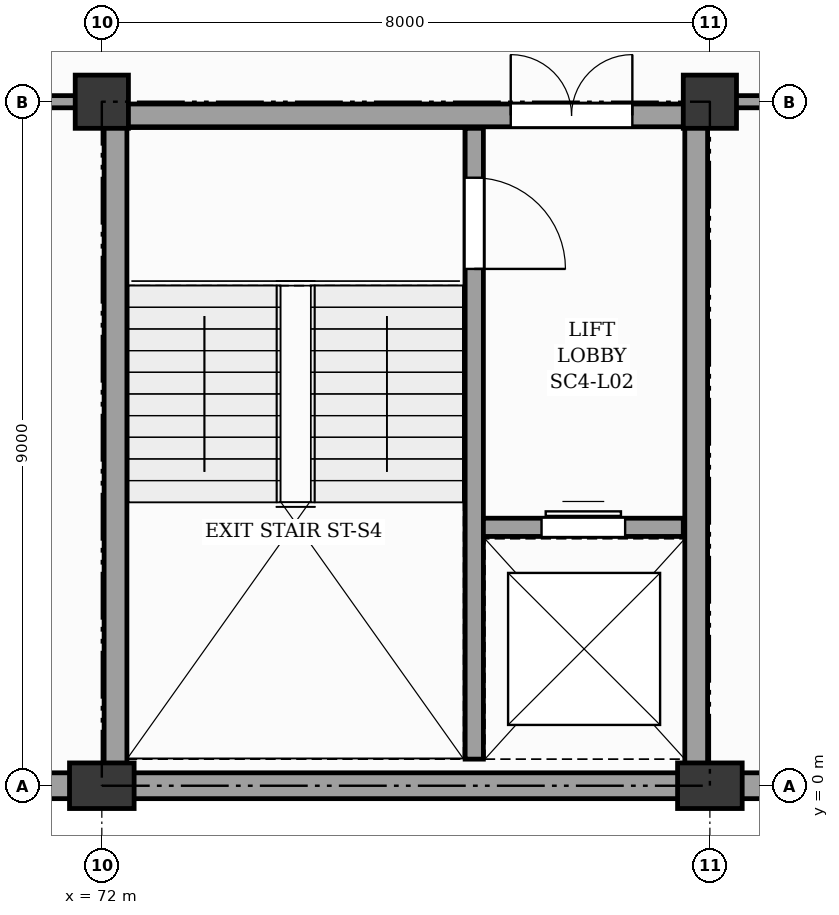
"""IFC4 building model, lengths in metres.
Left out: names, types, materials, properties, quantities, classifications, styles, units other than length and angle.
Written with IfcOpenShell. Run it as: python <this file> out.ifc"""

import sys

from ifc_helpers import new_model, si_unit, direction, frame, frame_2d, origin, origin_2d, place, context, subcontext, project, spatial, rectangle, extrude, element, fill, save


model = new_model("IFC4")
c1 = context("Model", 3, precision=1e-05, world=origin(), true_north=direction((0.0, 1.0)))
c2 = subcontext(c1, "Body", "Model", "MODEL_VIEW")
j1 = project(units=[si_unit("LENGTHUNIT", "METRE"), si_unit("PLANEANGLEUNIT", "RADIAN")], contexts=[c1])
p1 = place(None, origin())
s1 = spatial("IfcSite", under=j1, at=p1, CompositionType="ELEMENT")
p2 = place(p1, origin())
s2 = spatial("IfcBuilding", under=s1, at=p2, CompositionType="ELEMENT")
p3 = place(p2, frame((0.0, 0.0, 9.6)))
s3 = spatial("IfcBuildingStorey", under=s2, at=p3, CompositionType="ELEMENT", Elevation=9.6)
p4 = place(p3, frame((72.0, 0.0, 0.0), z_axis=(0.0, 0.0, 1.0), x_axis=(1.0, 0.0, 0.0)))
e1 = element("IfcColumn", 1, at=p4, inside=s3, PredefinedType="PILASTER", context=c2, shape_type="SweptSolid", body=[
    extrude(rectangle(XDim=0.85, YDim=0.6, at=origin_2d()), origin(), (0.0, 0.0, 1.0), 6.6),
])
p5 = place(p3, frame((72.0, 9.0, 0.0), z_axis=(0.0, 0.0, 1.0), x_axis=(1.0, 0.0, 0.0)))
e2 = element("IfcColumn", 2, at=p5, inside=s3, PredefinedType="COLUMN", context=c2, shape_type="SweptSolid", body=[
    extrude(rectangle(XDim=0.7, YDim=0.7, at=origin_2d()), origin(), (0.0, 0.0, 1.0), 6.6),
])
p6 = place(p3, frame((80.0, 0.0, 0.0), z_axis=(0.0, 0.0, 1.0), x_axis=(1.0, 0.0, 0.0)))
e3 = element("IfcColumn", 3, at=p6, inside=s3, PredefinedType="PILASTER", context=c2, shape_type="SweptSolid", body=[
    extrude(rectangle(XDim=0.85, YDim=0.6, at=origin_2d()), origin(), (0.0, 0.0, 1.0), 6.6),
])
p7 = place(p3, frame((80.0, 9.0, 0.0), z_axis=(0.0, 0.0, 1.0), x_axis=(1.0, 0.0, 0.0)))
e4 = element("IfcColumn", 4, at=p7, inside=s3, PredefinedType="COLUMN", context=c2, shape_type="SweptSolid", body=[
    extrude(rectangle(XDim=0.7, YDim=0.7, at=origin_2d()), origin(), (0.0, 0.0, 1.0), 6.6),
])
p8 = place(p3, frame((64.4, 0.0, 0.0), z_axis=(0.0, 0.0, 1.0), x_axis=(1.0, 0.0, 0.0)))
e5 = element("IfcWall", 5, at=p8, inside=s3, PredefinedType="SOLIDWALL", context=c2, shape_type="SweptSolid", body=[
    extrude(rectangle(XDim=7.2, YDim=0.34, at=frame_2d((3.6, 0.0))), origin(), (0.0, 0.0, 1.0), 4.98),
])
for number, where, z_axis, x_axis in (
    (6, (72.4, 0.0, 0.0), (0.0, 0.0, 1.0), (1.0, 0.0, 0.0)),
    (7, (80.4, 0.0, 0.0), (0.0, 0.0, 1.0), (1.0, 0.0, 0.0)),
):
    element("IfcWall", number, at=place(p3, frame(where, z_axis=z_axis, x_axis=x_axis)), inside=s3, PredefinedType="SOLIDWALL", context=c2, shape_type="SweptSolid", body=[
        extrude(rectangle(XDim=7.2, YDim=0.34, at=frame_2d((3.6, 0.0))), origin(), (0.0, 0.0, 1.0), 5.64),
    ])
p9 = place(p3, frame((76.9, 0.35, 0.0), z_axis=(0.0, 0.0, 1.0), x_axis=(0.0, 1.0, 0.0)))
e8 = element("IfcWall", 8, at=p9, inside=s3, PredefinedType="SHEAR", context=c2, shape_type="SweptSolid", body=[
    extrude(rectangle(XDim=8.3, YDim=0.24, at=frame_2d((4.15, 0.0))), origin(), (0.0, 0.0, 1.0), 6.32),
])
p10 = place(p9, frame((6.45, 0.0, 0.0)))
e9 = element("IfcOpeningElement", 9, at=p10, cuts=e8, PredefinedType="OPENING", context=c2, shape_type="SweptSolid", body=[
    extrude(rectangle(XDim=1.2, YDim=2.15, at=frame_2d((0.6, 1.075))), frame((0.0, 0.13, 0.0), z_axis=(0.0, -1.0, 0.0), x_axis=(1.0, 0.0, 0.0)), (0.0, 0.0, 1.0), 0.26),
])
p11 = place(p3, frame((77.02, 3.4, 0.0), z_axis=(0.0, 0.0, 1.0), x_axis=(1.0, 0.0, 0.0)))
e10 = element("IfcWall", 10, at=p11, inside=s3, PredefinedType="SHEAR", context=c2, shape_type="SweptSolid", body=[
    extrude(rectangle(XDim=2.63, YDim=0.24, at=frame_2d((1.315, 0.0))), origin(), (0.0, 0.0, 1.0), 6.32),
])
p12 = place(p11, frame((0.765, 0.0, 0.0)))
e11 = element("IfcOpeningElement", 11, at=p12, cuts=e10, PredefinedType="OPENING", context=c2, shape_type="SweptSolid", body=[
    extrude(rectangle(XDim=1.1, YDim=2.15, at=frame_2d((0.55, 1.075))), frame((0.0, 0.13, 0.0), z_axis=(0.0, -1.0, 0.0), x_axis=(1.0, 0.0, 0.0)), (0.0, 0.0, 1.0), 0.26),
])
for number, where, z_axis, x_axis in (
    (12, (72.18, 0.18, 0.0), (0.0, 0.0, 1.0), (0.0, 1.0, 0.0)),
    (13, (79.82, 0.18, 0.0), (0.0, 0.0, 1.0), (0.0, 1.0, 0.0)),
):
    element("IfcWall", number, at=place(p3, frame(where, z_axis=z_axis, x_axis=x_axis)), inside=s3, PredefinedType="SHEAR", context=c2, shape_type="SweptSolid", body=[
        extrude(rectangle(XDim=8.64, YDim=0.3, at=frame_2d((4.32, 0.0))), origin(), (0.0, 0.0, 1.0), 6.32),
    ])
p13 = place(p3, frame((72.03, 8.82, 0.0), z_axis=(0.0, 0.0, 1.0), x_axis=(1.0, 0.0, 0.0)))
e14 = element("IfcWall", 14, at=p13, inside=s3, PredefinedType="SHEAR", context=c2, shape_type="SweptSolid", body=[
    extrude(rectangle(XDim=7.94, YDim=0.3, at=frame_2d((3.97, 0.0))), origin(), (0.0, 0.0, 1.0), 6.32),
])
p14 = place(p13, frame((5.35, 0.0, 0.0)))
e15 = element("IfcOpeningElement", 15, at=p14, cuts=e14, PredefinedType="OPENING", context=c2, shape_type="SweptSolid", body=[
    extrude(rectangle(XDim=1.6, YDim=2.15, at=frame_2d((0.8, 1.075))), frame((0.0, 0.16, 0.0), z_axis=(0.0, -1.0, 0.0), x_axis=(1.0, 0.0, 0.0)), (0.0, 0.0, 1.0), 0.32),
])
p15 = place(p3, frame((80.3, 9.0, 0.0), z_axis=(0.0, 0.0, 1.0), x_axis=(1.0, 0.0, 0.0)))
e16 = element("IfcWall", 16, at=p15, inside=s3, PredefinedType="PARTITIONING", context=c2, shape_type="SweptSolid", body=[
    extrude(rectangle(XDim=7.4, YDim=0.16, at=frame_2d((3.7, 0.0))), origin(), (0.0, 0.0, 1.0), 5.5),
])
p16 = place(p15, frame((3.2, 0.0, 0.0)))
e17 = element("IfcOpeningElement", 17, at=p16, cuts=e16, PredefinedType="OPENING", context=c2, shape_type="SweptSolid", body=[
    extrude(rectangle(XDim=1.0, YDim=2.1, at=frame_2d((0.5, 1.05))), frame((0.0, 0.09, 0.0), z_axis=(0.0, -1.0, 0.0), x_axis=(1.0, 0.0, 0.0)), (0.0, 0.0, 1.0), 0.18),
])
p17 = place(p3, frame((64.3, 9.0, 0.0), z_axis=(0.0, 0.0, 1.0), x_axis=(1.0, 0.0, 0.0)))
e18 = element("IfcWall", 18, at=p17, inside=s3, PredefinedType="PARTITIONING", context=c2, shape_type="SweptSolid", body=[
    extrude(rectangle(XDim=7.4, YDim=0.16, at=frame_2d((3.7, 0.0))), origin(), (0.0, 0.0, 1.0), 4.68),
])
p18 = place(p10, frame((1.2, 0.0, 0.0), z_axis=(0.0, 0.0, 1.0), x_axis=(-1.0, 0.0, 0.0)))
e19 = element("IfcDoor", 19, at=p18, inside=s3, OperationType="SINGLE_SWING_LEFT", PredefinedType="DOOR", context=c2, shape_type="SweptSolid", body=[
    extrude(rectangle(XDim=1.2, YDim=2.15, at=frame_2d((0.6, 1.075))), frame((0.0, 0.025, 0.0), z_axis=(0.0, -1.0, 0.0), x_axis=(1.0, 0.0, 0.0)), (0.0, 0.0, 1.0), 0.05),
])
fill(e9, e19)
p19 = place(p12, origin())
e20 = element("IfcDoor", 20, at=p19, inside=s3, OperationType="DOUBLE_DOOR_SLIDING", PredefinedType="DOOR", context=c2, shape_type="SweptSolid", body=[
    extrude(rectangle(XDim=1.1, YDim=2.15, at=frame_2d((0.55, 1.075))), frame((0.0, 0.025, 0.0), z_axis=(0.0, -1.0, 0.0), x_axis=(1.0, 0.0, 0.0)), (0.0, 0.0, 1.0), 0.05),
])
fill(e11, e20)
p20 = place(p14, origin())
e21 = element("IfcDoor", 21, at=p20, inside=s3, OperationType="DOUBLE_DOOR_SINGLE_SWING", PredefinedType="DOOR", context=c2, shape_type="SweptSolid", body=[
    extrude(rectangle(XDim=1.6, YDim=2.15, at=frame_2d((0.8, 1.075))), frame((0.0, 0.025, 0.0), z_axis=(0.0, -1.0, 0.0), x_axis=(1.0, 0.0, 0.0)), (0.0, 0.0, 1.0), 0.05),
])
fill(e15, e21)
save(model, sys.argv[1])
